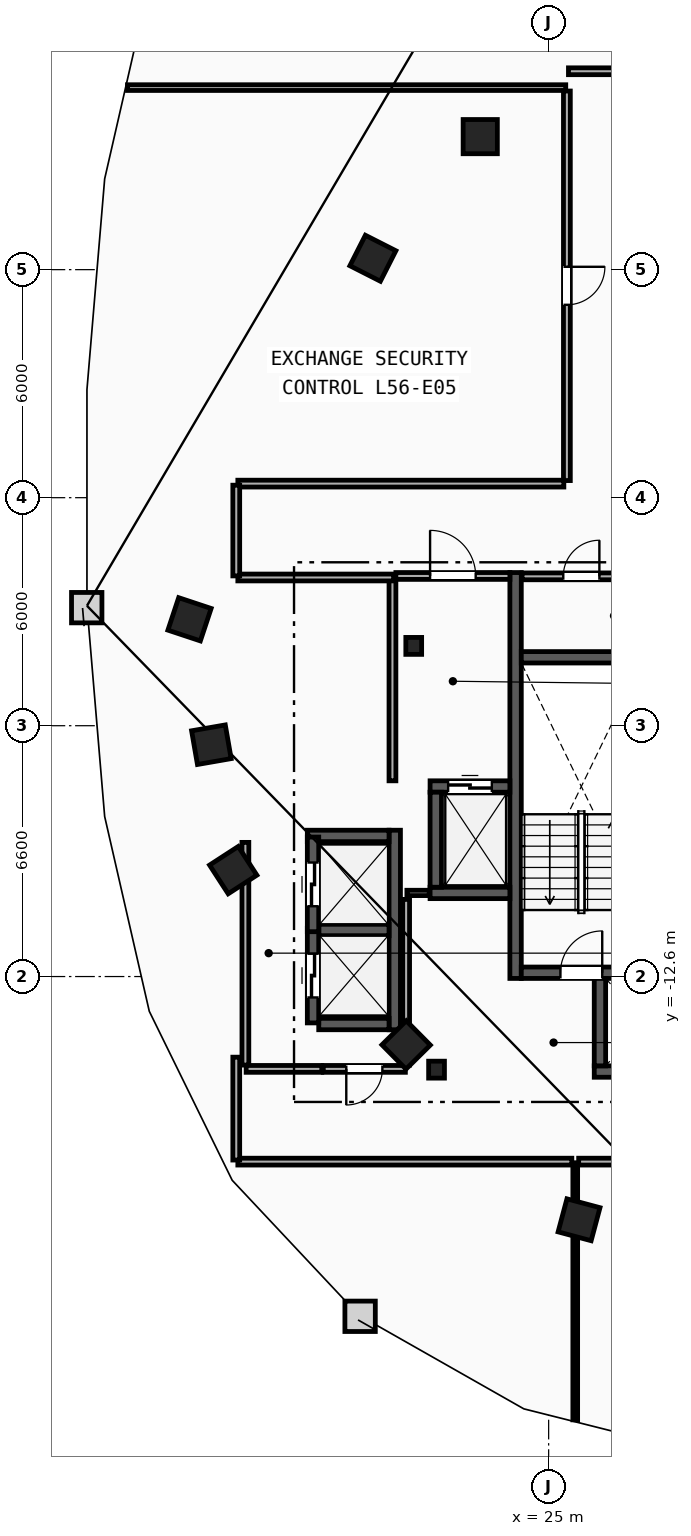
"""IFC4 building model, lengths in metres.
Left out: names, types, materials, properties, quantities, classifications, styles, units other than length and angle.
Written with IfcOpenShell. Run it as: python <this file> out.ifc"""

import sys

from ifc_helpers import new_model, si_unit, direction, frame, frame_2d, origin, origin_2d, place, context, subcontext, project, spatial, rectangle, i_section, extrude, element, fill, save


model = new_model("IFC4")
c1 = context("Model", 3, precision=1e-05, world=origin(), true_north=direction((0.0, 1.0)))
c2 = subcontext(c1, "Body", "Model", "MODEL_VIEW")
j1 = project(units=[si_unit("LENGTHUNIT", "METRE"), si_unit("PLANEANGLEUNIT", "RADIAN")], contexts=[c1])
p1 = place(None, origin())
s1 = spatial("IfcSite", under=j1, at=p1, CompositionType="ELEMENT")
p2 = place(p1, origin())
s2 = spatial("IfcBuilding", under=s1, at=p2, CompositionType="ELEMENT")
p3 = place(p2, frame((0.0, 0.0, 213.4)))
s3 = spatial("IfcBuildingStorey", under=s2, at=p3, CompositionType="ELEMENT", Elevation=213.4)
for number, where, z_axis, x_axis in (
    (1, (21.45, -3.9, 0.0), (0.0, 0.0, 1.0), (1.0, 0.0, 0.0)),
    (2, (22.05, -15.05, 0.0), (0.0, 0.0, 1.0), (1.0, 0.0, 0.0)),
):
    element("IfcColumn", number, at=place(p3, frame(where, z_axis=z_axis, x_axis=x_axis)), inside=s3, PredefinedType="COLUMN", context=c2, shape_type="SweptSolid", body=[
        extrude(i_section(OverallWidth=0.416, OverallDepth=0.446, WebThickness=0.039, FlangeThickness=0.063, FilletRadius=0.018, at=origin_2d()), origin(), (0.0, 0.0, 1.0), 3.6),
    ])
for number, where, z_axis, x_axis in (
    (3, (23.2, 9.5, 0.0), (0.0, 0.0, 1.0), (1.0, 0.0, 0.0)),
    (4, (15.55, -3.2, 0.0), (0.0, 0.0, 1.0), (-0.315, -0.949, 0.0)),
    (5, (16.125, -6.5, 0.0), (0.0, 0.0, 1.0), (0.172, -0.985, 0.0)),
    (6, (16.7, -9.8, 0.0), (0.0, 0.0, 1.0), (0.544, -0.839, 0.0)),
    (7, (21.25, -14.4, 0.0), (0.0, 0.0, 1.0), (0.703, -0.711, 0.0)),
    (8, (25.8, -19.0, 0.0), (0.0, 0.0, 1.0), (0.966, -0.259, 0.0)),
    (9, (20.375, 6.3, 0.0), (0.0, 0.0, 1.0), (-0.453, -0.892, 0.0)),
):
    element("IfcColumn", number, at=place(p3, frame(where, z_axis=z_axis, x_axis=x_axis)), inside=s3, PredefinedType="COLUMN", context=c2, shape_type="SweptSolid", body=[
        extrude(rectangle(XDim=0.9, YDim=0.9, at=origin_2d()), origin(), (0.0, 0.0, 1.0), 3.6),
    ])
p4 = place(p3, frame((24.13, -12.65, 0.0), z_axis=(0.0, 0.0, 1.0), x_axis=(0.0, 1.0, 0.0)))
e10 = element("IfcWall", 10, at=p4, inside=s3, PredefinedType="SHEAR", context=c2, shape_type="SweptSolid", body=[
    extrude(rectangle(XDim=10.68, YDim=0.3, at=frame_2d((5.34, 0.0))), origin(), (0.0, 0.0, 1.0), 3.34),
])
p5 = place(p3, frame((24.28, -12.5, 0.0), z_axis=(0.0, 0.0, 1.0), x_axis=(1.0, 0.0, 0.0)))
e11 = element("IfcWall", 11, at=p5, inside=s3, PredefinedType="SHEAR", context=c2, shape_type="SweptSolid", body=[
    extrude(rectangle(XDim=3.16, YDim=0.3, at=frame_2d((1.58, 0.0))), origin(), (0.0, 0.0, 1.0), 3.34),
])
p6 = place(p5, frame((1.03, 0.0, 0.0)))
e12 = element("IfcOpeningElement", 12, at=p6, cuts=e11, PredefinedType="OPENING", context=c2, shape_type="SweptSolid", body=[
    extrude(rectangle(XDim=1.1, YDim=2.15, at=frame_2d((0.55, 1.075))), frame((0.0, 0.16, 0.0), z_axis=(0.0, -1.0, 0.0), x_axis=(1.0, 0.0, 0.0)), (0.0, 0.0, 1.0), 0.32),
])
p7 = place(p3, frame((24.28, -4.2, 0.0), z_axis=(0.0, 0.0, 1.0), x_axis=(1.0, 0.0, 0.0)))
e13 = element("IfcWall", 13, at=p7, inside=s3, PredefinedType="SHEAR", context=c2, shape_type="SweptSolid", body=[
    extrude(rectangle(XDim=3.16, YDim=0.3, at=frame_2d((1.58, 0.0))), origin(), (0.0, 0.0, 1.0), 3.34),
])
p8 = place(p3, frame((20.89, -7.45, 0.0), z_axis=(0.0, 0.0, 1.0), x_axis=(0.0, 1.0, 0.0)))
e14 = element("IfcWall", 14, at=p8, inside=s3, PredefinedType="PARTITIONING", context=c2, shape_type="SweptSolid", body=[
    extrude(rectangle(XDim=5.3, YDim=0.18, at=frame_2d((2.65, 0.0))), origin(), (0.0, 0.0, 1.0), 3.34),
])
p9 = place(p3, frame((20.98, -2.06, 0.0), z_axis=(0.0, 0.0, 1.0), x_axis=(1.0, 0.0, 0.0)))
e15 = element("IfcWall", 15, at=p9, inside=s3, PredefinedType="PARTITIONING", context=c2, shape_type="SweptSolid", body=[
    extrude(rectangle(XDim=3.0, YDim=0.18, at=frame_2d((1.5, 0.0))), origin(), (0.0, 0.0, 1.0), 3.34),
])
p10 = place(p9, frame((0.9, 0.0, 0.0)))
e16 = element("IfcOpeningElement", 16, at=p10, cuts=e15, PredefinedType="OPENING", context=c2, shape_type="SweptSolid", body=[
    extrude(rectangle(XDim=1.2, YDim=2.15, at=frame_2d((0.6, 1.075))), frame((0.0, 0.1, 0.0), z_axis=(0.0, -1.0, 0.0), x_axis=(1.0, 0.0, 0.0)), (0.0, 0.0, 1.0), 0.2),
])
p11 = place(p3, frame((21.88, -7.6, 0.0), z_axis=(0.0, 0.0, 1.0), x_axis=(1.0, 0.0, 0.0)))
e17 = element("IfcWall", 17, at=p11, inside=s3, PredefinedType="SHEAR", context=c2, shape_type="SweptSolid", body=[
    extrude(rectangle(XDim=2.1, YDim=0.3, at=frame_2d((1.05, 0.0))), origin(), (0.0, 0.0, 1.0), 3.34),
])
p12 = place(p11, frame((0.475, 0.0, 0.0)))
e18 = element("IfcOpeningElement", 18, at=p12, cuts=e17, PredefinedType="OPENING", context=c2, shape_type="SweptSolid", body=[
    extrude(rectangle(XDim=1.15, YDim=2.2, at=frame_2d((0.575, 1.1))), frame((0.0, 0.16, 0.0), z_axis=(0.0, -1.0, 0.0), x_axis=(1.0, 0.0, 0.0)), (0.0, 0.0, 1.0), 0.32),
])
p13 = place(p3, frame((21.88, -10.4, 0.0), z_axis=(0.0, 0.0, 1.0), x_axis=(1.0, 0.0, 0.0)))
e19 = element("IfcWall", 19, at=p13, inside=s3, PredefinedType="SHEAR", context=c2, shape_type="SweptSolid", body=[
    extrude(rectangle(XDim=2.1, YDim=0.3, at=frame_2d((1.05, 0.0))), origin(), (0.0, 0.0, 1.0), 3.34),
])
for number, where, z_axis, x_axis in (
    (20, (22.03, -10.25, 0.0), (0.0, 0.0, 1.0), (0.0, 1.0, 0.0)),
    (21, (26.2, -15.1, 0.0), (0.0, 0.0, 1.0), (1.0, 0.0, 0.0)),
):
    element("IfcWall", number, at=place(p3, frame(where, z_axis=z_axis, x_axis=x_axis)), inside=s3, PredefinedType="SHEAR", context=c2, shape_type="SweptSolid", body=[
        extrude(rectangle(XDim=2.5, YDim=0.3, at=frame_2d((1.25, 0.0))), origin(), (0.0, 0.0, 1.0), 3.34),
    ])
p14 = place(p3, frame((26.35, -14.95, 0.0), z_axis=(0.0, 0.0, 1.0), x_axis=(0.0, 1.0, 0.0)))
e22 = element("IfcWall", 22, at=p14, inside=s3, PredefinedType="SHEAR", context=c2, shape_type="SweptSolid", body=[
    extrude(rectangle(XDim=2.3, YDim=0.3, at=frame_2d((1.15, 0.0))), origin(), (0.0, 0.0, 1.0), 3.34),
])
p15 = place(p3, frame((20.95, -14.0, 0.0), z_axis=(0.0, 0.0, 1.0), x_axis=(0.0, 1.0, 0.0)))
e23 = element("IfcWall", 23, at=p15, inside=s3, PredefinedType="SHEAR", context=c2, shape_type="SweptSolid", body=[
    extrude(rectangle(XDim=5.25, YDim=0.3, at=frame_2d((2.625, 0.0))), origin(), (0.0, 0.0, 1.0), 3.34),
])
p16 = place(p3, frame((18.95, -13.85, 0.0), z_axis=(0.0, 0.0, 1.0), x_axis=(1.0, 0.0, 0.0)))
e24 = element("IfcWall", 24, at=p16, inside=s3, PredefinedType="SHEAR", context=c2, shape_type="SweptSolid", body=[
    extrude(rectangle(XDim=1.85, YDim=0.3, at=frame_2d((0.925, 0.0))), origin(), (0.0, 0.0, 1.0), 3.34),
])
p17 = place(p3, frame((18.65, -8.9, 0.0), z_axis=(0.0, 0.0, 1.0), x_axis=(1.0, 0.0, 0.0)))
e25 = element("IfcWall", 25, at=p17, inside=s3, PredefinedType="SHEAR", context=c2, shape_type="SweptSolid", body=[
    extrude(rectangle(XDim=2.15, YDim=0.3, at=frame_2d((1.075, 0.0))), origin(), (0.0, 0.0, 1.0), 3.34),
])
p18 = place(p3, frame((18.95, -11.375, 0.0), z_axis=(0.0, 0.0, 1.0), x_axis=(1.0, 0.0, 0.0)))
e26 = element("IfcWall", 26, at=p18, inside=s3, PredefinedType="SHEAR", context=c2, shape_type="SweptSolid", body=[
    extrude(rectangle(XDim=1.85, YDim=0.3, at=frame_2d((0.925, 0.0))), origin(), (0.0, 0.0, 1.0), 3.34),
])
p19 = place(p3, frame((18.8, -13.82, 0.0), z_axis=(0.0, 0.0, 1.0), x_axis=(0.0, 1.0, 0.0)))
e27 = element("IfcWall", 27, at=p19, inside=s3, PredefinedType="SHEAR", context=c2, shape_type="SweptSolid", body=[
    extrude(rectangle(XDim=2.49, YDim=0.3, at=frame_2d((1.245, 0.0))), origin(), (0.0, 0.0, 1.0), 3.34),
])
p20 = place(p19, frame((0.67, 0.0, 0.0)))
e28 = element("IfcOpeningElement", 28, at=p20, cuts=e27, PredefinedType="OPENING", context=c2, shape_type="SweptSolid", body=[
    extrude(rectangle(XDim=1.15, YDim=2.2, at=frame_2d((0.575, 1.1))), frame((0.0, 0.16, 0.0), z_axis=(0.0, -1.0, 0.0), x_axis=(1.0, 0.0, 0.0)), (0.0, 0.0, 1.0), 0.32),
])
p21 = place(p3, frame((18.8, -11.42, 0.0), z_axis=(0.0, 0.0, 1.0), x_axis=(0.0, 1.0, 0.0)))
e29 = element("IfcWall", 29, at=p21, inside=s3, PredefinedType="SHEAR", context=c2, shape_type="SweptSolid", body=[
    extrude(rectangle(XDim=2.49, YDim=0.3, at=frame_2d((1.245, 0.0))), origin(), (0.0, 0.0, 1.0), 3.34),
])
p22 = place(p21, frame((0.67, 0.0, 0.0)))
e30 = element("IfcOpeningElement", 30, at=p22, cuts=e29, PredefinedType="OPENING", context=c2, shape_type="SweptSolid", body=[
    extrude(rectangle(XDim=1.15, YDim=2.2, at=frame_2d((0.575, 1.1))), frame((0.0, 0.16, 0.0), z_axis=(0.0, -1.0, 0.0), x_axis=(1.0, 0.0, 0.0)), (0.0, 0.0, 1.0), 0.32),
])
p23 = place(p3, frame((17.02, -14.93, 0.0), z_axis=(0.0, 0.0, 1.0), x_axis=(0.0, 1.0, 0.0)))
e31 = element("IfcWall", 31, at=p23, inside=s3, PredefinedType="PARTITIONING", context=c2, shape_type="SweptSolid", body=[
    extrude(rectangle(XDim=5.86, YDim=0.18, at=frame_2d((2.93, 0.0))), origin(), (0.0, 0.0, 1.0), 3.34),
])
p24 = place(p3, frame((17.04, -15.03, 0.0), z_axis=(0.0, 0.0, 1.0), x_axis=(1.0, 0.0, 0.0)))
e32 = element("IfcWall", 32, at=p24, inside=s3, PredefinedType="PARTITIONING", context=c2, shape_type="SweptSolid", body=[
    extrude(rectangle(XDim=1.99, YDim=0.18, at=frame_2d((0.995, 0.0))), origin(), (0.0, 0.0, 1.0), 3.34),
])
p25 = place(p3, frame((21.23, -15.03, 0.0), z_axis=(0.0, 0.0, 1.0), x_axis=(-1.0, 0.0, 0.0)))
e33 = element("IfcWall", 33, at=p25, inside=s3, PredefinedType="PARTITIONING", context=c2, shape_type="SweptSolid", body=[
    extrude(rectangle(XDim=2.16, YDim=0.18, at=frame_2d((1.08, 0.0))), origin(), (0.0, 0.0, 1.0), 3.34),
])
p26 = place(p25, frame((0.605, 0.0, 0.0)))
e34 = element("IfcOpeningElement", 34, at=p26, cuts=e33, PredefinedType="OPENING", context=c2, shape_type="SweptSolid", body=[
    extrude(rectangle(XDim=0.95, YDim=2.1, at=frame_2d((0.475, 1.05))), frame((0.0, 0.1, 0.0), z_axis=(0.0, -1.0, 0.0), x_axis=(1.0, 0.0, 0.0)), (0.0, 0.0, 1.0), 0.2),
])
p27 = place(p3, frame((21.27, -10.4, 0.0), z_axis=(0.0, 0.0, 1.0), x_axis=(1.0, 0.0, 0.0)))
e35 = element("IfcWall", 35, at=p27, inside=s3, PredefinedType="PARTITIONING", context=c2, shape_type="SweptSolid", body=[
    extrude(rectangle(XDim=0.59, YDim=0.14, at=frame_2d((0.295, 0.0))), origin(), (0.0, 0.0, 1.0), 3.34),
])
p28 = place(p3, frame((21.25, -14.93, 0.0), z_axis=(0.0, 0.0, 1.0), x_axis=(0.0, 1.0, 0.0)))
e36 = element("IfcWall", 36, at=p28, inside=s3, PredefinedType="PARTITIONING", context=c2, shape_type="SweptSolid", body=[
    extrude(rectangle(XDim=4.36, YDim=0.18, at=frame_2d((2.18, 0.0))), origin(), (0.0, 0.0, 1.0), 3.34),
])
p29 = place(p3, frame((24.3, -2.07, 0.0), z_axis=(0.0, 0.0, 1.0), x_axis=(1.0, 0.0, 0.0)))
e37 = element("IfcWall", 37, at=p29, inside=s3, PredefinedType="PARTITIONING", context=c2, shape_type="SweptSolid", body=[
    extrude(rectangle(XDim=3.12, YDim=0.18, at=frame_2d((1.56, 0.0))), origin(), (0.0, 0.0, 1.0), 3.34),
])
p30 = place(p29, frame((1.085, 0.0, 0.0)))
e38 = element("IfcOpeningElement", 38, at=p30, cuts=e37, PredefinedType="OPENING", context=c2, shape_type="SweptSolid", body=[
    extrude(rectangle(XDim=0.95, YDim=2.1, at=frame_2d((0.475, 1.05))), frame((0.0, 0.1, 0.0), z_axis=(0.0, -1.0, 0.0), x_axis=(1.0, 0.0, 0.0)), (0.0, 0.0, 1.0), 0.2),
])
p31 = place(p3, frame((13.918, 10.79, 0.0), z_axis=(0.0, 0.0, 1.0), x_axis=(1.0, 0.0, 0.0)))
e39 = element("IfcWall", 39, at=p31, inside=s3, PredefinedType="PARTITIONING", context=c2, shape_type="SweptSolid", body=[
    extrude(rectangle(XDim=11.532, YDim=0.15, at=frame_2d((5.766, 0.0))), origin(), (0.0, 0.0, 1.0), 3.34),
])
p32 = place(p3, frame((25.7, -24.265, 0.0), z_axis=(0.0, 0.0, 1.0), x_axis=(0.0, 1.0, 0.0)))
e40 = element("IfcWall", 40, at=p32, inside=s3, PredefinedType="PARTITIONING", context=c2, shape_type="SweptSolid", body=[
    extrude(rectangle(XDim=6.765, YDim=0.125, at=frame_2d((3.382, 0.0))), origin(), (0.0, 0.0, 1.0), 3.34),
])
p33 = place(p3, frame((25.79, -17.47, 0.0), z_axis=(0.0, 0.0, 1.0), x_axis=(1.0, 0.0, 0.0)))
e41 = element("IfcWall", 41, at=p33, inside=s3, PredefinedType="PARTITIONING", context=c2, shape_type="SweptSolid", body=[
    extrude(rectangle(XDim=7.82, YDim=0.18, at=frame_2d((3.91, 0.0))), origin(), (0.0, 0.0, 1.0), 3.34),
])
p34 = place(p33, frame((3.41, 0.0, 0.0)))
e42 = element("IfcOpeningElement", 42, at=p34, cuts=e41, PredefinedType="OPENING", context=c2, shape_type="SweptSolid", body=[
    extrude(rectangle(XDim=1.0, YDim=2.15, at=frame_2d((0.5, 1.075))), frame((0.0, 0.1, 0.0), z_axis=(0.0, -1.0, 0.0), x_axis=(1.0, 0.0, 0.0)), (0.0, 0.0, 1.0), 0.2),
])
p35 = place(p3, frame((25.48, 10.7, 0.0), z_axis=(0.0, 0.0, 1.0), x_axis=(0.0, -1.0, 0.0)))
e43 = element("IfcWall", 43, at=p35, inside=s3, PredefinedType="PARTITIONING", context=c2, shape_type="SweptSolid", body=[
    extrude(rectangle(XDim=10.25, YDim=0.18, at=frame_2d((5.125, 0.0))), origin(), (0.0, 0.0, 1.0), 3.34),
])
p36 = place(p35, frame((4.625, 0.0, 0.0)))
e44 = element("IfcOpeningElement", 44, at=p36, cuts=e43, PredefinedType="OPENING", context=c2, shape_type="SweptSolid", body=[
    extrude(rectangle(XDim=1.0, YDim=2.15, at=frame_2d((0.5, 1.075))), frame((0.0, 0.1, 0.0), z_axis=(0.0, -1.0, 0.0), x_axis=(1.0, 0.0, 0.0)), (0.0, 0.0, 1.0), 0.2),
])
p37 = place(p3, frame((16.822, -17.47, 0.0), z_axis=(0.0, 0.0, 1.0), x_axis=(1.0, 0.0, 0.0)))
e45 = element("IfcWall", 45, at=p37, inside=s3, PredefinedType="PARTITIONING", context=c2, shape_type="SweptSolid", body=[
    extrude(rectangle(XDim=8.789, YDim=0.18, at=frame_2d((4.394, 0.0))), origin(), (0.0, 0.0, 1.0), 3.34),
])
p38 = place(p3, frame((25.4, 0.37, 0.0), z_axis=(0.0, 0.0, 1.0), x_axis=(-1.0, 0.0, 0.0)))
e46 = element("IfcWall", 46, at=p38, inside=s3, PredefinedType="PARTITIONING", context=c2, shape_type="SweptSolid", body=[
    extrude(rectangle(XDim=8.578, YDim=0.18, at=frame_2d((4.289, 0.0))), origin(), (0.0, 0.0, 1.0), 3.34),
])
p39 = place(p3, frame((16.822, -2.1, 0.0), z_axis=(0.0, 0.0, 1.0), x_axis=(1.0, 0.0, 0.0)))
e47 = element("IfcWall", 47, at=p39, inside=s3, PredefinedType="PARTITIONING", context=c2, shape_type="SweptSolid", body=[
    extrude(rectangle(XDim=4.098, YDim=0.18, at=frame_2d((2.049, 0.0))), origin(), (0.0, 0.0, 1.0), 3.34),
])
p40 = place(p3, frame((16.78, -14.721, 0.0), z_axis=(0.0, 0.0, 1.0), x_axis=(0.0, -1.0, 0.0)))
e48 = element("IfcWall", 48, at=p40, inside=s3, PredefinedType="PARTITIONING", context=c2, shape_type="SweptSolid", body=[
    extrude(rectangle(XDim=2.707, YDim=0.18, at=frame_2d((1.354, 0.0))), origin(), (0.0, 0.0, 1.0), 3.34),
])
p41 = place(p3, frame((16.78, 0.329, 0.0), z_axis=(0.0, 0.0, 1.0), x_axis=(0.0, -1.0, 0.0)))
e49 = element("IfcWall", 49, at=p41, inside=s3, PredefinedType="PARTITIONING", context=c2, shape_type="SweptSolid", body=[
    extrude(rectangle(XDim=2.387, YDim=0.18, at=frame_2d((1.194, 0.0))), origin(), (0.0, 0.0, 1.0), 3.34),
])
p42 = place(p3, frame((27.878, 11.22, 0.0), z_axis=(0.0, 0.0, 1.0), x_axis=(-1.0, 0.0, 0.0)))
e50 = element("IfcWall", 50, at=p42, inside=s3, PredefinedType="PARTITIONING", context=c2, shape_type="SweptSolid", body=[
    extrude(rectangle(XDim=2.357, YDim=0.18, at=frame_2d((1.178, 0.0))), origin(), (0.0, 0.0, 1.0), 3.34),
])
p43 = place(p6, origin())
e51 = element("IfcDoor", 51, at=p43, inside=s3, OperationType="SINGLE_SWING_RIGHT", PredefinedType="DOOR", context=c2, shape_type="SweptSolid", body=[
    extrude(rectangle(XDim=1.1, YDim=2.15, at=frame_2d((0.55, 1.075))), frame((0.0, 0.025, 0.0), z_axis=(0.0, -1.0, 0.0), x_axis=(1.0, 0.0, 0.0)), (0.0, 0.0, 1.0), 0.05),
])
fill(e12, e51)
p44 = place(p10, origin())
e52 = element("IfcDoor", 52, at=p44, inside=s3, OperationType="SINGLE_SWING_LEFT", PredefinedType="DOOR", context=c2, shape_type="SweptSolid", body=[
    extrude(rectangle(XDim=1.2, YDim=2.15, at=frame_2d((0.6, 1.075))), frame((0.0, 0.025, 0.0), z_axis=(0.0, -1.0, 0.0), x_axis=(1.0, 0.0, 0.0)), (0.0, 0.0, 1.0), 0.05),
])
fill(e16, e52)
p45 = place(p12, origin())
e53 = element("IfcDoor", 53, at=p45, inside=s3, OperationType="SLIDING_TO_LEFT", PredefinedType="TRAPDOOR", context=c2, shape_type="SweptSolid", body=[
    extrude(rectangle(XDim=1.15, YDim=2.2, at=frame_2d((0.575, 1.1))), frame((0.0, 0.025, 0.0), z_axis=(0.0, -1.0, 0.0), x_axis=(1.0, 0.0, 0.0)), (0.0, 0.0, 1.0), 0.05),
])
fill(e18, e53)
p46 = place(p20, origin())
e54 = element("IfcDoor", 54, at=p46, inside=s3, OperationType="SLIDING_TO_LEFT", PredefinedType="TRAPDOOR", context=c2, shape_type="SweptSolid", body=[
    extrude(rectangle(XDim=1.15, YDim=2.2, at=frame_2d((0.575, 1.1))), frame((0.0, 0.025, 0.0), z_axis=(0.0, -1.0, 0.0), x_axis=(1.0, 0.0, 0.0)), (0.0, 0.0, 1.0), 0.05),
])
fill(e28, e54)
p47 = place(p22, origin())
e55 = element("IfcDoor", 55, at=p47, inside=s3, OperationType="SLIDING_TO_LEFT", PredefinedType="TRAPDOOR", context=c2, shape_type="SweptSolid", body=[
    extrude(rectangle(XDim=1.15, YDim=2.2, at=frame_2d((0.575, 1.1))), frame((0.0, 0.025, 0.0), z_axis=(0.0, -1.0, 0.0), x_axis=(1.0, 0.0, 0.0)), (0.0, 0.0, 1.0), 0.05),
])
fill(e30, e55)
p48 = place(p36, origin())
e56 = element("IfcDoor", 56, at=p48, inside=s3, OperationType="SINGLE_SWING_LEFT", PredefinedType="DOOR", context=c2, shape_type="SweptSolid", body=[
    extrude(rectangle(XDim=1.0, YDim=2.15, at=frame_2d((0.5, 1.075))), frame((0.0, 0.025, 0.0), z_axis=(0.0, -1.0, 0.0), x_axis=(1.0, 0.0, 0.0)), (0.0, 0.0, 1.0), 0.05),
])
fill(e44, e56)
p49 = place(p30, origin())
e57 = element("IfcDoor", 57, at=p49, inside=s3, OperationType="SINGLE_SWING_RIGHT", PredefinedType="DOOR", context=c2, shape_type="SweptSolid", body=[
    extrude(rectangle(XDim=0.95, YDim=2.1, at=frame_2d((0.475, 1.05))), frame((0.0, 0.025, 0.0), z_axis=(0.0, -1.0, 0.0), x_axis=(1.0, 0.0, 0.0)), (0.0, 0.0, 1.0), 0.05),
])
fill(e38, e57)
p50 = place(p26, origin())
e58 = element("IfcDoor", 58, at=p50, inside=s3, OperationType="SINGLE_SWING_RIGHT", PredefinedType="DOOR", context=c2, shape_type="SweptSolid", body=[
    extrude(rectangle(XDim=0.95, YDim=2.1, at=frame_2d((0.475, 1.05))), frame((0.0, 0.025, 0.0), z_axis=(0.0, -1.0, 0.0), x_axis=(1.0, 0.0, 0.0)), (0.0, 0.0, 1.0), 0.05),
])
fill(e34, e58)
save(model, sys.argv[1])
